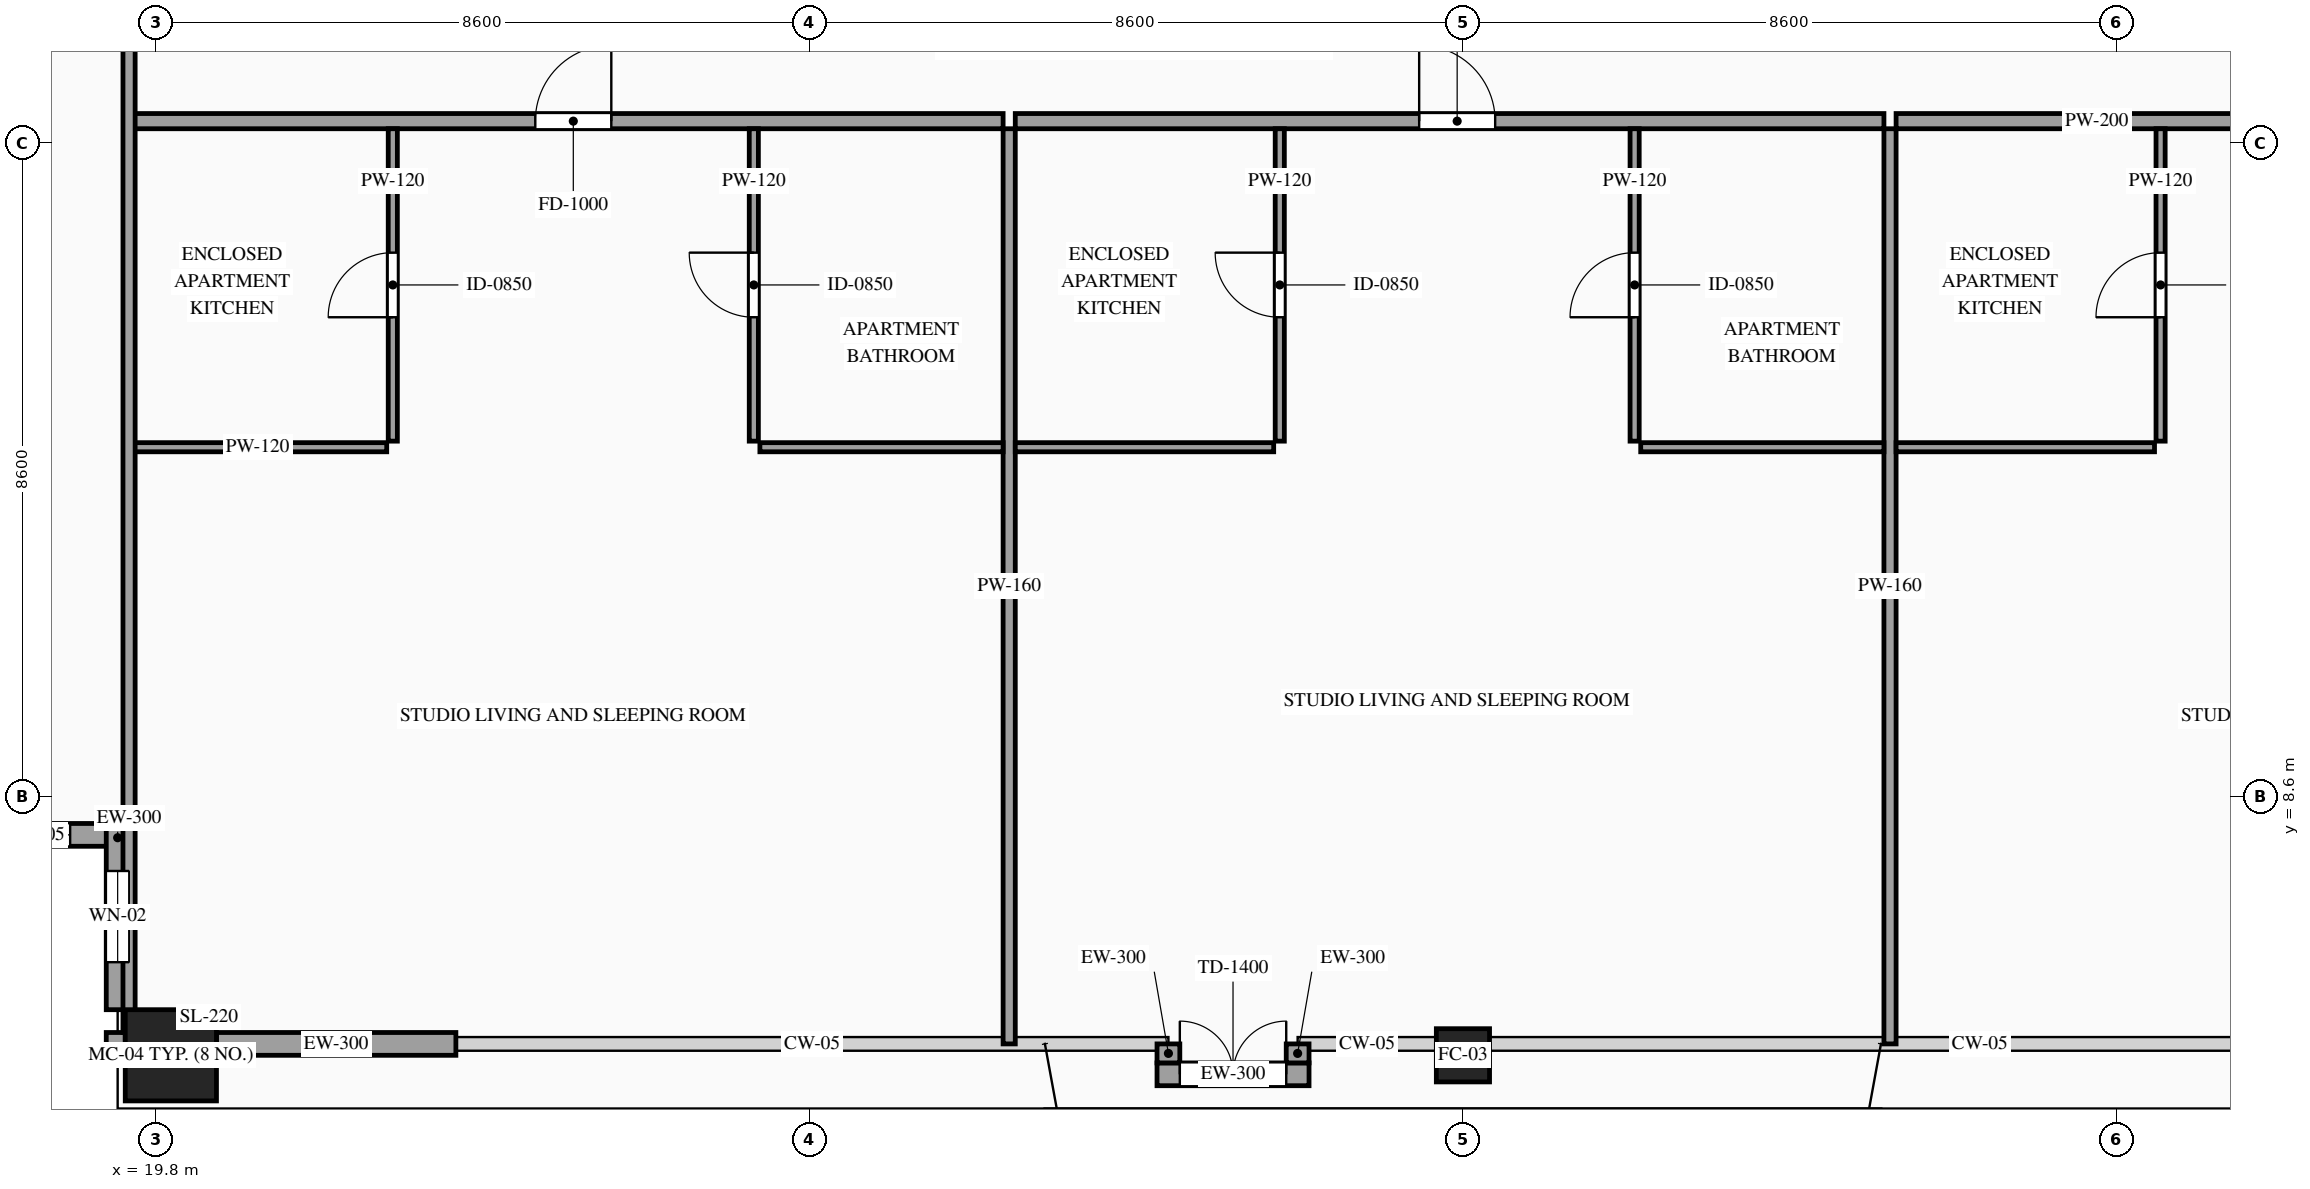
"""IFC4 building model, lengths in metres.
Left out: names, types, materials, properties, quantities, classifications, styles, units other than length and angle.
Written with IfcOpenShell. Run it as: python <this file> out.ifc"""

import sys

from ifc_helpers import new_model, si_unit, direction, frame, frame_2d, origin, origin_2d, place, context, subcontext, project, spatial, rectangle, hollow_rectangle, extrude, source, transform, mapped, element, fill, save


model = new_model("IFC4")
c1 = context("Model", 3, precision=1e-05, world=origin(), true_north=direction((0.0, 1.0)))
c2 = subcontext(c1, "Body", "Model", "MODEL_VIEW")
j1 = project(units=[si_unit("LENGTHUNIT", "METRE"), si_unit("PLANEANGLEUNIT", "RADIAN")], contexts=[c1])
p1 = place(None, origin())
s1 = spatial("IfcSite", under=j1, at=p1, CompositionType="ELEMENT")
p2 = place(p1, origin())
s2 = spatial("IfcBuilding", under=s1, at=p2, CompositionType="ELEMENT")
p3 = place(p2, frame((0.0, 0.0, 241.6)))
s3 = spatial("IfcBuildingStorey", under=s2, at=p3, CompositionType="ELEMENT", Elevation=241.6)
m1 = source(origin(), c2, "Body", "SweptSolid", [
    extrude(hollow_rectangle(XDim=1.2, YDim=1.2, WallThickness=0.055, at=origin_2d()), origin(), (0.0, 0.0, 1.0), 3.5),
])
p4 = place(p3, frame((20.0, 5.2, 0.0), z_axis=(0.0, 0.0, 1.0), x_axis=(1.0, 0.0, 0.0)))
e1 = element("IfcColumn", 1, at=p4, inside=s3, PredefinedType="COLUMN", context=c2, shape_type="MappedRepresentation", body=[
    mapped(m1, transform((0.0, 0.0, 0.0), scale=1.0)),
])
m2 = source(origin(), c2, "Body", "SweptSolid", [
    extrude(hollow_rectangle(XDim=0.7, YDim=0.7, WallThickness=0.032, at=origin_2d()), origin(), (0.0, 0.0, 1.0), 3.5),
])
p5 = place(p3, frame((37.0, 5.2, 0.0), z_axis=(0.0, 0.0, 1.0), x_axis=(1.0, 0.0, 0.0)))
e2 = element("IfcColumn", 2, at=p5, inside=s3, PredefinedType="COLUMN", context=c2, shape_type="MappedRepresentation", body=[
    mapped(m2, transform((0.0, 0.0, 0.0), scale=1.0)),
])
p6 = place(p3, frame((17.0, 8.1, 0.0), z_axis=(0.0, 0.0, 1.0), x_axis=(1.0, 0.0, 0.0)))
e3 = element("IfcWall", 3, at=p6, inside=s3, PredefinedType="SOLIDWALL", context=c2, shape_type="SweptSolid", body=[
    extrude(rectangle(XDim=2.45, YDim=0.3, at=frame_2d((1.225, 0.0))), origin(), (0.0, 0.0, 1.0), 3.28),
])
p7 = place(p6, frame((0.775, 0.0, 0.85)))
e4 = element("IfcOpeningElement", 4, at=p7, cuts=e3, PredefinedType="OPENING", context=c2, shape_type="SweptSolid", body=[
    extrude(rectangle(XDim=0.9, YDim=1.5, at=frame_2d((0.45, 0.75))), frame((0.0, 0.165, 0.0), z_axis=(0.0, -1.0, 0.0), x_axis=(1.0, 0.0, 0.0)), (0.0, 0.0, 1.0), 0.33),
])
p8 = place(p3, frame((19.3, 8.25, 0.0), z_axis=(0.0, 0.0, 1.0), x_axis=(0.0, -1.0, 0.0)))
e5 = element("IfcWall", 5, at=p8, inside=s3, PredefinedType="SOLIDWALL", context=c2, shape_type="SweptSolid", body=[
    extrude(rectangle(XDim=2.45, YDim=0.3, at=frame_2d((1.225, 0.0))), origin(), (0.0, 0.0, 1.0), 3.28),
])
p9 = place(p8, frame((0.625, 0.0, 0.85)))
e6 = element("IfcOpeningElement", 6, at=p9, cuts=e5, PredefinedType="OPENING", context=c2, shape_type="SweptSolid", body=[
    extrude(rectangle(XDim=1.2, YDim=2.1, at=frame_2d((0.6, 1.05))), frame((0.0, 0.165, 0.0), z_axis=(0.0, -1.0, 0.0), x_axis=(1.0, 0.0, 0.0)), (0.0, 0.0, 1.0), 0.33),
])
m3 = source(origin(), c2, "Body", "SweptSolid", [
    extrude(rectangle(XDim=0.25, YDim=0.3, at=frame_2d((0.125, 0.0))), origin(), (0.0, 0.0, 1.0), 3.28),
])
p10 = place(p3, frame((19.15, 5.35, 0.0), z_axis=(0.0, 0.0, 1.0), x_axis=(1.0, 0.0, 0.0)))
e7 = element("IfcWall", 7, at=p10, inside=s3, PredefinedType="SOLIDWALL", context=c2, shape_type="MappedRepresentation", body=[
    mapped(m3, transform((0.0, 0.0, 0.0), scale=1.0)),
])
m4 = source(origin(), c2, "Body", "SweptSolid", [
    extrude(rectangle(XDim=3.15, YDim=0.3, at=frame_2d((1.575, 0.0))), origin(), (0.0, 0.0, 1.0), 2.835),
])
p11 = place(p3, frame((20.6, 5.35, 0.0), z_axis=(0.0, 0.0, 1.0), x_axis=(1.0, 0.0, 0.0)))
e8 = element("IfcWall", 8, at=p11, inside=s3, PredefinedType="SOLIDWALL", context=c2, shape_type="MappedRepresentation", body=[
    mapped(m4, transform((0.0, 0.0, 0.0), scale=1.0)),
])
p12 = place(p3, frame((32.975, 4.95, 0.0), z_axis=(0.0, 0.0, 1.0), x_axis=(1.0, 0.0, 0.0)))
e9 = element("IfcWall", 9, at=p12, inside=s3, PredefinedType="SOLIDWALL", context=c2, shape_type="SweptSolid", body=[
    extrude(rectangle(XDim=2.0, YDim=0.3, at=frame_2d((1.0, 0.0))), origin(), (0.0, 0.0, 1.0), 2.835),
])
p13 = place(p12, frame((0.3, 0.0, 0.0)))
e10 = element("IfcOpeningElement", 10, at=p13, cuts=e9, PredefinedType="OPENING", context=c2, shape_type="SweptSolid", body=[
    extrude(rectangle(XDim=1.4, YDim=2.3, at=frame_2d((0.7, 1.15))), frame((0.0, 0.165, 0.0), z_axis=(0.0, -1.0, 0.0), x_axis=(1.0, 0.0, 0.0)), (0.0, 0.0, 1.0), 0.33),
])
for number, where, z_axis, x_axis in (
    (11, (33.125, 5.35, 0.0), (0.0, 0.0, 1.0), (0.0, -1.0, 0.0)),
    (12, (34.825, 5.1, 0.0), (0.0, 0.0, 1.0), (0.0, 1.0, 0.0)),
):
    element("IfcWall", number, at=place(p3, frame(where, z_axis=z_axis, x_axis=x_axis)), inside=s3, PredefinedType="SOLIDWALL", context=c2, shape_type="MappedRepresentation", body=[
        mapped(m3, transform((0.0, 0.0, 0.0), scale=1.0)),
    ])
p14 = place(p3, frame((19.44, 17.49, 0.0), z_axis=(0.0, 0.0, 1.0), x_axis=(1.0, 0.0, 0.0)))
e13 = element("IfcWall", 13, at=p14, inside=s3, PredefinedType="PARTITIONING", context=c2, shape_type="SweptSolid", body=[
    extrude(rectangle(XDim=11.51, YDim=0.2, at=frame_2d((5.755, 0.0))), origin(), (0.0, 0.0, 1.0), 3.28),
])
p15 = place(p14, frame((5.355, 0.0, 0.0)))
e14 = element("IfcOpeningElement", 14, at=p15, cuts=e13, PredefinedType="OPENING", context=c2, shape_type="SweptSolid", body=[
    extrude(rectangle(XDim=1.0, YDim=2.2, at=frame_2d((0.5, 1.1))), frame((0.0, 0.115, 0.0), z_axis=(0.0, -1.0, 0.0), x_axis=(1.0, 0.0, 0.0)), (0.0, 0.0, 1.0), 0.23),
])
m5 = source(origin(), c2, "Body", "SweptSolid", [
    extrude(rectangle(XDim=12.04, YDim=0.16, at=frame_2d((6.02, 0.0))), origin(), (0.0, 0.0, 1.0), 3.28),
])
p16 = place(p3, frame((31.03, 5.35, 0.0), z_axis=(0.0, 0.0, 1.0), x_axis=(0.0, 1.0, 0.0)))
e15 = element("IfcWall", 15, at=p16, inside=s3, PredefinedType="PARTITIONING", context=c2, shape_type="MappedRepresentation", body=[
    mapped(m5, transform((0.0, 0.0, 0.0), scale=1.0)),
])
m6 = source(origin(), c2, "Body", "SweptSolid", [
    extrude(rectangle(XDim=3.4, YDim=0.12, at=frame_2d((1.7, 0.0))), origin(), (0.0, 0.0, 1.0), 3.28),
])
p17 = place(p3, frame((19.44, 13.2, 0.0), z_axis=(0.0, 0.0, 1.0), x_axis=(1.0, 0.0, 0.0)))
e16 = element("IfcWall", 16, at=p17, inside=s3, PredefinedType="PARTITIONING", context=c2, shape_type="MappedRepresentation", body=[
    mapped(m6, transform((0.0, 0.0, 0.0), scale=1.0)),
])
p18 = place(p3, frame((22.92, 13.28, 0.0), z_axis=(0.0, 0.0, 1.0), x_axis=(0.0, 1.0, 0.0)))
e17 = element("IfcWall", 17, at=p18, inside=s3, PredefinedType="PARTITIONING", context=c2, shape_type="SweptSolid", body=[
    extrude(rectangle(XDim=4.11, YDim=0.12, at=frame_2d((2.055, 0.0))), origin(), (0.0, 0.0, 1.0), 3.28),
])
p19 = place(p18, frame((1.63, 0.0, 0.0)))
e18 = element("IfcOpeningElement", 18, at=p19, cuts=e17, PredefinedType="OPENING", context=c2, shape_type="SweptSolid", body=[
    extrude(rectangle(XDim=0.85, YDim=2.1, at=frame_2d((0.425, 1.05))), frame((0.0, 0.075, 0.0), z_axis=(0.0, -1.0, 0.0), x_axis=(1.0, 0.0, 0.0)), (0.0, 0.0, 1.0), 0.15),
])
m7 = source(origin(), c2, "Body", "SweptSolid", [
    extrude(rectangle(XDim=3.2, YDim=0.12, at=frame_2d((1.6, 0.0))), origin(), (0.0, 0.0, 1.0), 3.28),
])
p20 = place(p3, frame((27.75, 13.2, 0.0), z_axis=(0.0, 0.0, 1.0), x_axis=(1.0, 0.0, 0.0)))
e19 = element("IfcWall", 19, at=p20, inside=s3, PredefinedType="PARTITIONING", context=c2, shape_type="MappedRepresentation", body=[
    mapped(m7, transform((0.0, 0.0, 0.0), scale=1.0)),
])
p21 = place(p3, frame((27.67, 13.28, 0.0), z_axis=(0.0, 0.0, 1.0), x_axis=(0.0, 1.0, 0.0)))
e20 = element("IfcWall", 20, at=p21, inside=s3, PredefinedType="PARTITIONING", context=c2, shape_type="SweptSolid", body=[
    extrude(rectangle(XDim=4.11, YDim=0.12, at=frame_2d((2.055, 0.0))), origin(), (0.0, 0.0, 1.0), 3.28),
])
p22 = place(p21, frame((1.63, 0.0, 0.0)))
e21 = element("IfcOpeningElement", 21, at=p22, cuts=e20, PredefinedType="OPENING", context=c2, shape_type="SweptSolid", body=[
    extrude(rectangle(XDim=0.85, YDim=2.1, at=frame_2d((0.425, 1.05))), frame((0.0, 0.075, 0.0), z_axis=(0.0, -1.0, 0.0), x_axis=(1.0, 0.0, 0.0)), (0.0, 0.0, 1.0), 0.15),
])
p23 = place(p3, frame((31.11, 17.49, 0.0), z_axis=(0.0, 0.0, 1.0), x_axis=(1.0, 0.0, 0.0)))
e22 = element("IfcWall", 22, at=p23, inside=s3, PredefinedType="PARTITIONING", context=c2, shape_type="SweptSolid", body=[
    extrude(rectangle(XDim=11.429, YDim=0.2, at=frame_2d((5.714, 0.0))), origin(), (0.0, 0.0, 1.0), 3.28),
])
p24 = place(p23, frame((5.314, 0.0, 0.0)))
e23 = element("IfcOpeningElement", 23, at=p24, cuts=e22, PredefinedType="OPENING", context=c2, shape_type="SweptSolid", body=[
    extrude(rectangle(XDim=1.0, YDim=2.2, at=frame_2d((0.5, 1.1))), frame((0.0, 0.115, 0.0), z_axis=(0.0, -1.0, 0.0), x_axis=(1.0, 0.0, 0.0)), (0.0, 0.0, 1.0), 0.23),
])
p25 = place(p3, frame((42.619, 5.35, 0.0), z_axis=(0.0, 0.0, 1.0), x_axis=(0.0, 1.0, 0.0)))
e24 = element("IfcWall", 24, at=p25, inside=s3, PredefinedType="PARTITIONING", context=c2, shape_type="MappedRepresentation", body=[
    mapped(m5, transform((0.0, 0.0, 0.0), scale=1.0)),
])
m8 = source(origin(), c2, "Body", "SweptSolid", [
    extrude(rectangle(XDim=3.4, YDim=0.12, at=frame_2d((1.7, 0.0))), origin(), (0.0, 0.0, 1.0), 3.28),
])
p26 = place(p3, frame((31.11, 13.2, 0.0), z_axis=(0.0, 0.0, 1.0), x_axis=(1.0, 0.0, 0.0)))
e25 = element("IfcWall", 25, at=p26, inside=s3, PredefinedType="PARTITIONING", context=c2, shape_type="MappedRepresentation", body=[
    mapped(m8, transform((0.0, 0.0, 0.0), scale=1.0)),
])
p27 = place(p3, frame((34.59, 13.28, 0.0), z_axis=(0.0, 0.0, 1.0), x_axis=(0.0, 1.0, 0.0)))
e26 = element("IfcWall", 26, at=p27, inside=s3, PredefinedType="PARTITIONING", context=c2, shape_type="SweptSolid", body=[
    extrude(rectangle(XDim=4.11, YDim=0.12, at=frame_2d((2.055, 0.0))), origin(), (0.0, 0.0, 1.0), 3.28),
])
p28 = place(p27, frame((1.63, 0.0, 0.0)))
e27 = element("IfcOpeningElement", 27, at=p28, cuts=e26, PredefinedType="OPENING", context=c2, shape_type="SweptSolid", body=[
    extrude(rectangle(XDim=0.85, YDim=2.1, at=frame_2d((0.425, 1.05))), frame((0.0, 0.075, 0.0), z_axis=(0.0, -1.0, 0.0), x_axis=(1.0, 0.0, 0.0)), (0.0, 0.0, 1.0), 0.15),
])
p29 = place(p3, frame((39.339, 13.2, 0.0), z_axis=(0.0, 0.0, 1.0), x_axis=(1.0, 0.0, 0.0)))
e28 = element("IfcWall", 28, at=p29, inside=s3, PredefinedType="PARTITIONING", context=c2, shape_type="MappedRepresentation", body=[
    mapped(m7, transform((0.0, 0.0, 0.0), scale=1.0)),
])
p30 = place(p3, frame((39.259, 13.28, 0.0), z_axis=(0.0, 0.0, 1.0), x_axis=(0.0, 1.0, 0.0)))
e29 = element("IfcWall", 29, at=p30, inside=s3, PredefinedType="PARTITIONING", context=c2, shape_type="SweptSolid", body=[
    extrude(rectangle(XDim=4.11, YDim=0.12, at=frame_2d((2.055, 0.0))), origin(), (0.0, 0.0, 1.0), 3.28),
])
p31 = place(p30, frame((1.63, 0.0, 0.0)))
e30 = element("IfcOpeningElement", 30, at=p31, cuts=e29, PredefinedType="OPENING", context=c2, shape_type="SweptSolid", body=[
    extrude(rectangle(XDim=0.85, YDim=2.1, at=frame_2d((0.425, 1.05))), frame((0.0, 0.075, 0.0), z_axis=(0.0, -1.0, 0.0), x_axis=(1.0, 0.0, 0.0)), (0.0, 0.0, 1.0), 0.15),
])
p32 = place(p3, frame((42.699, 17.49, 0.0), z_axis=(0.0, 0.0, 1.0), x_axis=(1.0, 0.0, 0.0)))
e31 = element("IfcWall", 31, at=p32, inside=s3, PredefinedType="PARTITIONING", context=c2, shape_type="SweptSolid", body=[
    extrude(rectangle(XDim=11.861, YDim=0.2, at=frame_2d((5.931, 0.0))), origin(), (0.0, 0.0, 1.0), 3.28),
])
p33 = place(p32, frame((5.531, 0.0, 0.0)))
e32 = element("IfcOpeningElement", 32, at=p33, cuts=e31, PredefinedType="OPENING", context=c2, shape_type="SweptSolid", body=[
    extrude(rectangle(XDim=1.0, YDim=2.2, at=frame_2d((0.5, 1.1))), frame((0.0, 0.115, 0.0), z_axis=(0.0, -1.0, 0.0), x_axis=(1.0, 0.0, 0.0)), (0.0, 0.0, 1.0), 0.23),
])
p34 = place(p3, frame((42.699, 13.2, 0.0), z_axis=(0.0, 0.0, 1.0), x_axis=(1.0, 0.0, 0.0)))
e33 = element("IfcWall", 33, at=p34, inside=s3, PredefinedType="PARTITIONING", context=c2, shape_type="MappedRepresentation", body=[
    mapped(m6, transform((0.0, 0.0, 0.0), scale=1.0)),
])
p35 = place(p3, frame((46.179, 13.28, 0.0), z_axis=(0.0, 0.0, 1.0), x_axis=(0.0, 1.0, 0.0)))
e34 = element("IfcWall", 34, at=p35, inside=s3, PredefinedType="PARTITIONING", context=c2, shape_type="SweptSolid", body=[
    extrude(rectangle(XDim=4.11, YDim=0.12, at=frame_2d((2.055, 0.0))), origin(), (0.0, 0.0, 1.0), 3.28),
])
p36 = place(p35, frame((1.63, 0.0, 0.0)))
e35 = element("IfcOpeningElement", 35, at=p36, cuts=e34, PredefinedType="OPENING", context=c2, shape_type="SweptSolid", body=[
    extrude(rectangle(XDim=0.85, YDim=2.1, at=frame_2d((0.425, 1.05))), frame((0.0, 0.075, 0.0), z_axis=(0.0, -1.0, 0.0), x_axis=(1.0, 0.0, 0.0)), (0.0, 0.0, 1.0), 0.15),
])
m9 = source(origin(), c2, "Body", "SweptSolid", [
    extrude(rectangle(XDim=26.69, YDim=0.16, at=frame_2d((13.345, 0.0))), origin(), (0.0, 0.0, 1.0), 3.28),
])
p37 = place(p3, frame((19.45, 5.5, 0.0), z_axis=(0.0, 0.0, 1.0), x_axis=(0.0, 1.0, 0.0)))
e36 = element("IfcWall", 36, at=p37, inside=s3, PredefinedType="PARTITIONING", context=c2, shape_type="MappedRepresentation", body=[
    mapped(m9, transform((0.0, 0.0, 0.0), scale=1.0)),
])
m10 = source(origin(), c2, "Body", "SweptSolid", [
    extrude(rectangle(XDim=0.9, YDim=1.5, at=frame_2d((0.45, 0.75))), frame((0.0, 0.03, 0.0), z_axis=(0.0, -1.0, 0.0), x_axis=(1.0, 0.0, 0.0)), (0.0, 0.0, 1.0), 0.06),
])
p38 = place(p7, origin())
e37 = element("IfcWindow", 37, at=p38, inside=s3, PartitioningType="SINGLE_PANEL", PredefinedType="WINDOW", context=c2, shape_type="MappedRepresentation", body=[
    mapped(m10, transform((0.0, 0.0, 0.0), scale=1.0)),
])
fill(e4, e37)
m11 = source(origin(), c2, "Body", "SweptSolid", [
    extrude(rectangle(XDim=1.2, YDim=2.1, at=frame_2d((0.6, 1.05))), frame((0.0, 0.03, 0.0), z_axis=(0.0, -1.0, 0.0), x_axis=(1.0, 0.0, 0.0)), (0.0, 0.0, 1.0), 0.06),
])
p39 = place(p9, origin())
e38 = element("IfcWindow", 38, at=p39, inside=s3, PartitioningType="SINGLE_PANEL", PredefinedType="WINDOW", context=c2, shape_type="MappedRepresentation", body=[
    mapped(m11, transform((0.0, 0.0, 0.0), scale=1.0)),
])
fill(e6, e38)
m12 = source(origin(), c2, "Body", "SweptSolid", [
    extrude(rectangle(XDim=1.4, YDim=2.3, at=frame_2d((0.7, 1.15))), frame((0.0, 0.025, 0.0), z_axis=(0.0, -1.0, 0.0), x_axis=(1.0, 0.0, 0.0)), (0.0, 0.0, 1.0), 0.05),
])
p40 = place(p13, origin())
e39 = element("IfcDoor", 39, at=p40, inside=s3, OperationType="DOUBLE_DOOR_SINGLE_SWING", PredefinedType="DOOR", context=c2, shape_type="MappedRepresentation", body=[
    mapped(m12, transform((0.0, 0.0, 0.0), scale=1.0)),
])
fill(e10, e39)
m13 = source(origin(), c2, "Body", "SweptSolid", [
    extrude(rectangle(XDim=1.0, YDim=2.2, at=frame_2d((0.5, 1.1))), frame((0.0, 0.025, 0.0), z_axis=(0.0, -1.0, 0.0), x_axis=(1.0, 0.0, 0.0)), (0.0, 0.0, 1.0), 0.05),
])
p41 = place(p15, origin())
e40 = element("IfcDoor", 40, at=p41, inside=s3, OperationType="SINGLE_SWING_RIGHT", PredefinedType="DOOR", context=c2, shape_type="MappedRepresentation", body=[
    mapped(m13, transform((0.0, 0.0, 0.0), scale=1.0)),
])
fill(e14, e40)
m14 = source(origin(), c2, "Body", "SweptSolid", [
    extrude(rectangle(XDim=0.85, YDim=2.1, at=frame_2d((0.425, 1.05))), frame((0.0, 0.025, 0.0), z_axis=(0.0, -1.0, 0.0), x_axis=(1.0, 0.0, 0.0)), (0.0, 0.0, 1.0), 0.05),
])
p42 = place(p19, origin())
e41 = element("IfcDoor", 41, at=p42, inside=s3, OperationType="SINGLE_SWING_LEFT", PredefinedType="DOOR", context=c2, shape_type="MappedRepresentation", body=[
    mapped(m14, transform((0.0, 0.0, 0.0), scale=1.0)),
])
fill(e18, e41)
p43 = place(p22, origin())
e42 = element("IfcDoor", 42, at=p43, inside=s3, OperationType="SINGLE_SWING_RIGHT", PredefinedType="DOOR", context=c2, shape_type="MappedRepresentation", body=[
    mapped(m14, transform((0.0, 0.0, 0.0), scale=1.0)),
])
fill(e21, e42)
p44 = place(p24, origin())
e43 = element("IfcDoor", 43, at=p44, inside=s3, OperationType="SINGLE_SWING_LEFT", PredefinedType="DOOR", context=c2, shape_type="MappedRepresentation", body=[
    mapped(m13, transform((0.0, 0.0, 0.0), scale=1.0)),
])
fill(e23, e43)
p45 = place(p28, origin())
e44 = element("IfcDoor", 44, at=p45, inside=s3, OperationType="SINGLE_SWING_RIGHT", PredefinedType="DOOR", context=c2, shape_type="MappedRepresentation", body=[
    mapped(m14, transform((0.0, 0.0, 0.0), scale=1.0)),
])
fill(e27, e44)
p46 = place(p31, origin())
e45 = element("IfcDoor", 45, at=p46, inside=s3, OperationType="SINGLE_SWING_LEFT", PredefinedType="DOOR", context=c2, shape_type="MappedRepresentation", body=[
    mapped(m14, transform((0.0, 0.0, 0.0), scale=1.0)),
])
fill(e30, e45)
p47 = place(p36, origin())
e46 = element("IfcDoor", 46, at=p47, inside=s3, OperationType="SINGLE_SWING_LEFT", PredefinedType="DOOR", context=c2, shape_type="MappedRepresentation", body=[
    mapped(m14, transform((0.0, 0.0, 0.0), scale=1.0)),
])
fill(e35, e46)
save(model, sys.argv[1])
